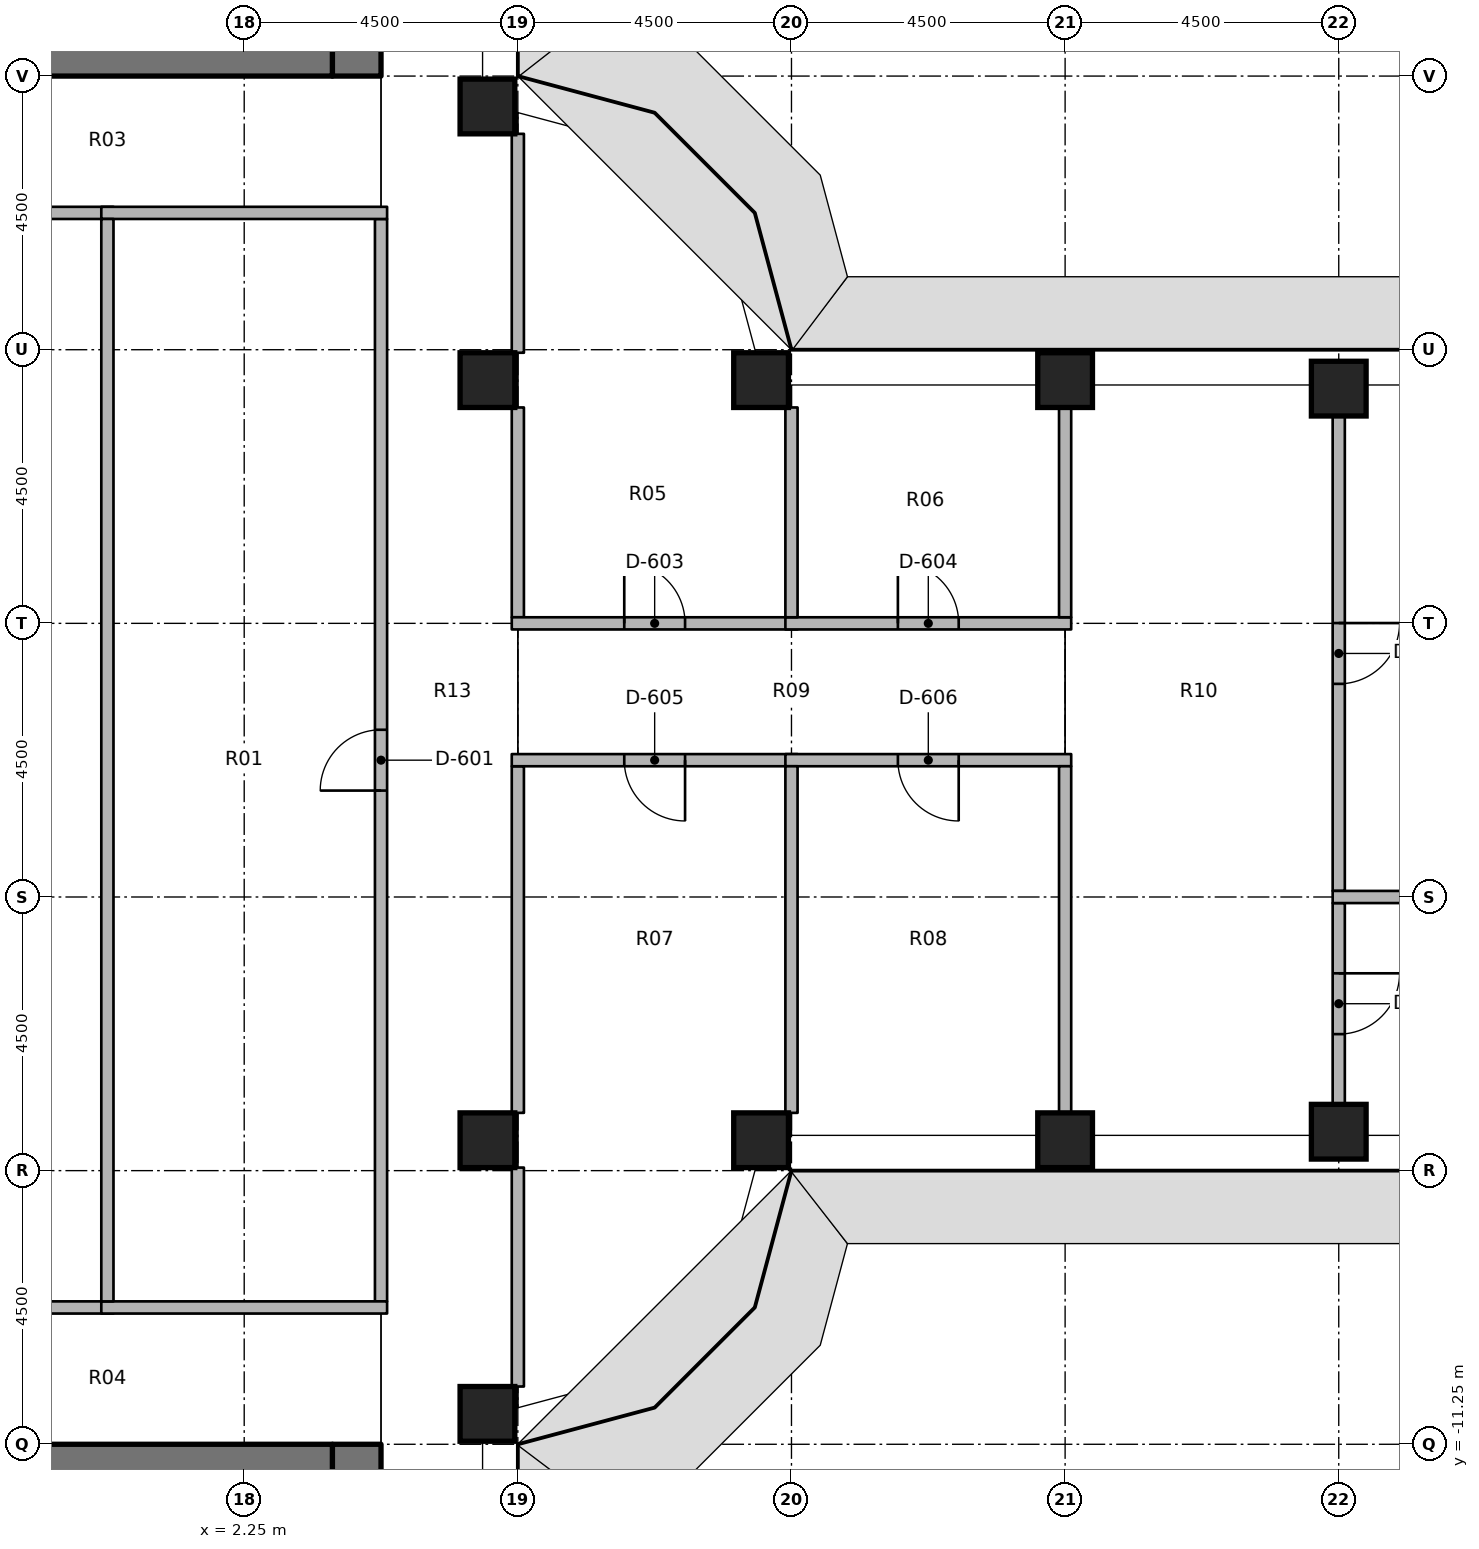
"""IFC4 building model, lengths in metres.
Left out: names, types, materials, properties, quantities, classifications, styles, units other than length and angle.
Written with IfcOpenShell. Run it as: python <this file> out.ifc"""

import sys

from ifc_helpers import new_model, si_unit, direction, frame, frame_2d, origin, origin_2d, place, context, subcontext, project, spatial, rectangle, extrude, element, fill, save


model = new_model("IFC4")
c1 = context("Model", 3, precision=1e-05, world=origin(), true_north=direction((0.0, 1.0)))
c2 = subcontext(c1, "Body", "Model", "MODEL_VIEW")
j1 = project(units=[si_unit("LENGTHUNIT", "METRE"), si_unit("PLANEANGLEUNIT", "RADIAN")], contexts=[c1])
p1 = place(None, origin())
s1 = spatial("IfcSite", under=j1, at=p1, CompositionType="ELEMENT")
p2 = place(p1, origin())
s2 = spatial("IfcBuilding", under=s1, at=p2, CompositionType="ELEMENT")
p3 = place(p2, frame((0.0, 0.0, 86.6)))
s3 = spatial("IfcBuildingStorey", under=s2, at=p3, CompositionType="ELEMENT", Elevation=86.6)
for number, where, z_axis, x_axis in (
    (1, (6.25, -10.75, 0.0), (0.0, 0.0, 1.0), (1.0, 0.0, 0.0)),
    (2, (6.25, -6.25, 0.0), (0.0, 0.0, 1.0), (1.0, 0.0, 0.0)),
    (3, (6.25, 6.25, 0.0), (0.0, 0.0, 1.0), (1.0, 0.0, 0.0)),
    (4, (6.25, 10.75, 0.0), (0.0, 0.0, 1.0), (1.0, 0.0, 0.0)),
    (5, (10.75, -6.25, 0.0), (0.0, 0.0, 1.0), (1.0, 0.0, 0.0)),
    (6, (10.75, 6.25, 0.0), (0.0, 0.0, 1.0), (1.0, 0.0, 0.0)),
    (7, (15.75, -6.25, 0.0), (0.0, 0.0, 1.0), (1.0, 0.0, 0.0)),
    (8, (15.75, 6.25, 0.0), (0.0, 0.0, 1.0), (1.0, 0.0, 0.0)),
    (9, (20.25, -6.11, 0.0), (0.0, 0.0, 1.0), (1.0, 0.0, 0.0)),
    (10, (20.25, 6.11, 0.0), (0.0, 0.0, 1.0), (1.0, 0.0, 0.0)),
):
    element("IfcColumn", number, at=place(p3, frame(where, z_axis=z_axis, x_axis=x_axis)), inside=s3, PredefinedType="COLUMN", context=c2, shape_type="SweptSolid", body=[
        extrude(rectangle(XDim=0.9, YDim=0.9, at=origin_2d()), origin(), (0.0, 0.0, 1.0), 3.65),
    ])
p4 = place(p3, frame((4.1, 11.25, 0.0), z_axis=(0.0, 0.0, 1.0), x_axis=(0.0, 1.0, 0.0)))
e11 = element("IfcWall", 11, at=p4, inside=s3, PredefinedType="SHEAR", context=c2, shape_type="SweptSolid", body=[
    extrude(rectangle(XDim=15.0, YDim=0.8, at=frame_2d((7.5, 0.0))), origin(), (0.0, 0.0, 1.0), 3.8),
])
p5 = place(p4, frame((7.15, 0.0, 0.0)))
e12 = element("IfcOpeningElement", 12, at=p5, cuts=e11, PredefinedType="OPENING", context=c2, shape_type="SweptSolid", body=[
    extrude(rectangle(XDim=1.5, YDim=2.3, at=frame_2d((0.75, 1.15))), frame((0.0, 0.41, 0.0), z_axis=(0.0, -1.0, 0.0), x_axis=(1.0, 0.0, 0.0)), (0.0, 0.0, 1.0), 0.82),
])
p6 = place(p4, frame((5.55, 0.0, 0.0)))
e13 = element("IfcOpeningElement", 13, at=p6, cuts=e11, PredefinedType="OPENING", context=c2, shape_type="SweptSolid", body=[
    extrude(rectangle(XDim=1.2, YDim=2.1, at=frame_2d((0.6, 1.05))), frame((0.0, 0.41, 0.0), z_axis=(0.0, -1.0, 0.0), x_axis=(1.0, 0.0, 0.0)), (0.0, 0.0, 1.0), 0.82),
])
p7 = place(p3, frame((-3.7, 11.65, 0.0), z_axis=(0.0, 0.0, 1.0), x_axis=(1.0, 0.0, 0.0)))
e14 = element("IfcWall", 14, at=p7, inside=s3, PredefinedType="SHEAR", context=c2, shape_type="SweptSolid", body=[
    extrude(rectangle(XDim=7.4, YDim=0.8, at=frame_2d((3.7, 0.0))), origin(), (0.0, 0.0, 1.0), 3.8),
])
p8 = place(p3, frame((4.1, -11.25, 0.0), z_axis=(0.0, 0.0, 1.0), x_axis=(0.0, -1.0, 0.0)))
e15 = element("IfcWall", 15, at=p8, inside=s3, PredefinedType="SHEAR", context=c2, shape_type="SweptSolid", body=[
    extrude(rectangle(XDim=15.0, YDim=0.8, at=frame_2d((7.5, 0.0))), origin(), (0.0, 0.0, 1.0), 3.8),
])
p9 = place(p8, frame((7.15, 0.0, 0.0)))
e16 = element("IfcOpeningElement", 16, at=p9, cuts=e15, PredefinedType="OPENING", context=c2, shape_type="SweptSolid", body=[
    extrude(rectangle(XDim=1.5, YDim=2.3, at=frame_2d((0.75, 1.15))), frame((0.0, 0.41, 0.0), z_axis=(0.0, -1.0, 0.0), x_axis=(1.0, 0.0, 0.0)), (0.0, 0.0, 1.0), 0.82),
])
p10 = place(p8, frame((13.9, 0.0, 0.0)))
e17 = element("IfcOpeningElement", 17, at=p10, cuts=e15, PredefinedType="OPENING", context=c2, shape_type="SweptSolid", body=[
    extrude(rectangle(XDim=0.9, YDim=2.1, at=frame_2d((0.45, 1.05))), frame((0.0, 0.41, 0.0), z_axis=(0.0, -1.0, 0.0), x_axis=(1.0, 0.0, 0.0)), (0.0, 0.0, 1.0), 0.82),
])
p11 = place(p8, frame((1.15, 0.0, 0.0)))
e18 = element("IfcOpeningElement", 18, at=p11, cuts=e15, PredefinedType="OPENING", context=c2, shape_type="SweptSolid", body=[
    extrude(rectangle(XDim=1.2, YDim=2.1, at=frame_2d((0.6, 1.05))), frame((0.0, 0.41, 0.0), z_axis=(0.0, -1.0, 0.0), x_axis=(1.0, 0.0, 0.0)), (0.0, 0.0, 1.0), 0.82),
])
p12 = place(p3, frame((-3.7, -11.65, 0.0), z_axis=(0.0, 0.0, 1.0), x_axis=(1.0, 0.0, 0.0)))
e19 = element("IfcWall", 19, at=p12, inside=s3, PredefinedType="SHEAR", context=c2, shape_type="SweptSolid", body=[
    extrude(rectangle(XDim=7.4, YDim=0.8, at=frame_2d((3.7, 0.0))), origin(), (0.0, 0.0, 1.0), 3.8),
])
p13 = place(p3, frame((4.5, -8.9, 0.0), z_axis=(0.0, 0.0, 1.0), x_axis=(0.0, 1.0, 0.0)))
e20 = element("IfcWall", 20, at=p13, inside=s3, PredefinedType="PARTITIONING", context=c2, shape_type="SweptSolid", body=[
    extrude(rectangle(XDim=17.8, YDim=0.2, at=frame_2d((8.9, 0.0))), origin(), (0.0, 0.0, 1.0), 2.738),
])
p14 = place(p13, frame((8.4, 0.0, 0.0)))
e21 = element("IfcOpeningElement", 21, at=p14, cuts=e20, PredefinedType="OPENING", context=c2, shape_type="SweptSolid", body=[
    extrude(rectangle(XDim=1.0, YDim=2.1, at=frame_2d((0.5, 1.05))), frame((0.0, 0.11, 0.0), z_axis=(0.0, -1.0, 0.0), x_axis=(1.0, 0.0, 0.0)), (0.0, 0.0, 1.0), 0.22),
])
p15 = place(p3, frame((6.75, 2.35, 0.0), z_axis=(0.0, 0.0, 1.0), x_axis=(0.0, 1.0, 0.0)))
e22 = element("IfcWall", 22, at=p15, inside=s3, PredefinedType="PARTITIONING", context=c2, shape_type="SweptSolid", body=[
    extrude(rectangle(XDim=3.45, YDim=0.2, at=frame_2d((1.725, 0.0))), origin(), (0.0, 0.0, 1.0), 2.738),
])
for number, where, z_axis, x_axis in (
    (23, (6.75, 6.7, 0.0), (0.0, 0.0, 1.0), (0.0, 1.0, 0.0)),
    (24, (6.75, -10.3, 0.0), (0.0, 0.0, 1.0), (0.0, 1.0, 0.0)),
):
    element("IfcWall", number, at=place(p3, frame(where, z_axis=z_axis, x_axis=x_axis)), inside=s3, PredefinedType="PARTITIONING", context=c2, shape_type="SweptSolid", body=[
        extrude(rectangle(XDim=3.6, YDim=0.2, at=frame_2d((1.8, 0.0))), origin(), (0.0, 0.0, 1.0), 2.738),
    ])
p16 = place(p3, frame((6.75, -5.8, 0.0), z_axis=(0.0, 0.0, 1.0), x_axis=(0.0, 1.0, 0.0)))
e25 = element("IfcWall", 25, at=p16, inside=s3, PredefinedType="PARTITIONING", context=c2, shape_type="SweptSolid", body=[
    extrude(rectangle(XDim=5.7, YDim=0.2, at=frame_2d((2.85, 0.0))), origin(), (0.0, 0.0, 1.0), 2.738),
])
for number, where, z_axis, x_axis in (
    (26, (-4.6, 9.0, 0.0), (0.0, 0.0, 1.0), (1.0, 0.0, 0.0)),
    (27, (-0.1, 9.0, 0.0), (0.0, 0.0, 1.0), (1.0, 0.0, 0.0)),
    (28, (-4.6, -9.0, 0.0), (0.0, 0.0, 1.0), (1.0, 0.0, 0.0)),
    (29, (-0.1, -9.0, 0.0), (0.0, 0.0, 1.0), (1.0, 0.0, 0.0)),
):
    element("IfcWall", number, at=place(p3, frame(where, z_axis=z_axis, x_axis=x_axis)), inside=s3, PredefinedType="PARTITIONING", context=c2, shape_type="SweptSolid", body=[
        extrude(rectangle(XDim=4.7, YDim=0.2, at=frame_2d((2.35, 0.0))), origin(), (0.0, 0.0, 1.0), 2.738),
    ])
p17 = place(p3, frame((0.0, -8.9, 0.0), z_axis=(0.0, 0.0, 1.0), x_axis=(0.0, 1.0, 0.0)))
e30 = element("IfcWall", 30, at=p17, inside=s3, PredefinedType="PARTITIONING", context=c2, shape_type="SweptSolid", body=[
    extrude(rectangle(XDim=17.8, YDim=0.2, at=frame_2d((8.9, 0.0))), origin(), (0.0, 0.0, 1.0), 2.738),
])
p18 = place(p3, frame((6.65, 2.25, 0.0), z_axis=(0.0, 0.0, 1.0), x_axis=(1.0, 0.0, 0.0)))
e31 = element("IfcWall", 31, at=p18, inside=s3, PredefinedType="PARTITIONING", context=c2, shape_type="SweptSolid", body=[
    extrude(rectangle(XDim=4.7, YDim=0.2, at=frame_2d((2.35, 0.0))), origin(), (0.0, 0.0, 1.0), 2.738),
])
p19 = place(p18, frame((1.85, 0.0, 0.0)))
e32 = element("IfcOpeningElement", 32, at=p19, cuts=e31, PredefinedType="OPENING", context=c2, shape_type="SweptSolid", body=[
    extrude(rectangle(XDim=1.0, YDim=2.1, at=frame_2d((0.5, 1.05))), frame((0.0, 0.11, 0.0), z_axis=(0.0, -1.0, 0.0), x_axis=(1.0, 0.0, 0.0)), (0.0, 0.0, 1.0), 0.22),
])
p20 = place(p3, frame((11.35, 0.0, 0.0), z_axis=(0.0, 0.0, 1.0), x_axis=(-1.0, 0.0, 0.0)))
e33 = element("IfcWall", 33, at=p20, inside=s3, PredefinedType="PARTITIONING", context=c2, shape_type="SweptSolid", body=[
    extrude(rectangle(XDim=4.7, YDim=0.2, at=frame_2d((2.35, 0.0))), origin(), (0.0, 0.0, 1.0), 2.738),
])
p21 = place(p20, frame((1.85, 0.0, 0.0)))
e34 = element("IfcOpeningElement", 34, at=p21, cuts=e33, PredefinedType="OPENING", context=c2, shape_type="SweptSolid", body=[
    extrude(rectangle(XDim=1.0, YDim=2.1, at=frame_2d((0.5, 1.05))), frame((0.0, 0.11, 0.0), z_axis=(0.0, -1.0, 0.0), x_axis=(1.0, 0.0, 0.0)), (0.0, 0.0, 1.0), 0.22),
])
p22 = place(p3, frame((11.15, 2.25, 0.0), z_axis=(0.0, 0.0, 1.0), x_axis=(1.0, 0.0, 0.0)))
e35 = element("IfcWall", 35, at=p22, inside=s3, PredefinedType="PARTITIONING", context=c2, shape_type="SweptSolid", body=[
    extrude(rectangle(XDim=4.7, YDim=0.2, at=frame_2d((2.35, 0.0))), origin(), (0.0, 0.0, 1.0), 2.738),
])
p23 = place(p22, frame((1.85, 0.0, 0.0)))
e36 = element("IfcOpeningElement", 36, at=p23, cuts=e35, PredefinedType="OPENING", context=c2, shape_type="SweptSolid", body=[
    extrude(rectangle(XDim=1.0, YDim=2.1, at=frame_2d((0.5, 1.05))), frame((0.0, 0.11, 0.0), z_axis=(0.0, -1.0, 0.0), x_axis=(1.0, 0.0, 0.0)), (0.0, 0.0, 1.0), 0.22),
])
p24 = place(p3, frame((15.85, 0.0, 0.0), z_axis=(0.0, 0.0, 1.0), x_axis=(-1.0, 0.0, 0.0)))
e37 = element("IfcWall", 37, at=p24, inside=s3, PredefinedType="PARTITIONING", context=c2, shape_type="SweptSolid", body=[
    extrude(rectangle(XDim=4.7, YDim=0.2, at=frame_2d((2.35, 0.0))), origin(), (0.0, 0.0, 1.0), 2.738),
])
p25 = place(p24, frame((1.85, 0.0, 0.0)))
e38 = element("IfcOpeningElement", 38, at=p25, cuts=e37, PredefinedType="OPENING", context=c2, shape_type="SweptSolid", body=[
    extrude(rectangle(XDim=1.0, YDim=2.1, at=frame_2d((0.5, 1.05))), frame((0.0, 0.11, 0.0), z_axis=(0.0, -1.0, 0.0), x_axis=(1.0, 0.0, 0.0)), (0.0, 0.0, 1.0), 0.22),
])
p26 = place(p3, frame((11.25, 2.35, 0.0), z_axis=(0.0, 0.0, 1.0), x_axis=(0.0, 1.0, 0.0)))
e39 = element("IfcWall", 39, at=p26, inside=s3, PredefinedType="PARTITIONING", context=c2, shape_type="SweptSolid", body=[
    extrude(rectangle(XDim=3.45, YDim=0.2, at=frame_2d((1.725, 0.0))), origin(), (0.0, 0.0, 1.0), 2.738),
])
p27 = place(p3, frame((11.25, -5.8, 0.0), z_axis=(0.0, 0.0, 1.0), x_axis=(0.0, 1.0, 0.0)))
e40 = element("IfcWall", 40, at=p27, inside=s3, PredefinedType="PARTITIONING", context=c2, shape_type="SweptSolid", body=[
    extrude(rectangle(XDim=5.7, YDim=0.2, at=frame_2d((2.85, 0.0))), origin(), (0.0, 0.0, 1.0), 2.738),
])
p28 = place(p3, frame((15.75, 2.35, 0.0), z_axis=(0.0, 0.0, 1.0), x_axis=(0.0, 1.0, 0.0)))
e41 = element("IfcWall", 41, at=p28, inside=s3, PredefinedType="PARTITIONING", context=c2, shape_type="SweptSolid", body=[
    extrude(rectangle(XDim=3.45, YDim=0.2, at=frame_2d((1.725, 0.0))), origin(), (0.0, 0.0, 1.0), 2.738),
])
p29 = place(p3, frame((15.75, -5.8, 0.0), z_axis=(0.0, 0.0, 1.0), x_axis=(0.0, 1.0, 0.0)))
e42 = element("IfcWall", 42, at=p29, inside=s3, PredefinedType="PARTITIONING", context=c2, shape_type="SweptSolid", body=[
    extrude(rectangle(XDim=5.7, YDim=0.2, at=frame_2d((2.85, 0.0))), origin(), (0.0, 0.0, 1.0), 2.738),
])
p30 = place(p3, frame((20.25, -2.35, 0.0), z_axis=(0.0, 0.0, 1.0), x_axis=(0.0, -1.0, 0.0)))
e43 = element("IfcWall", 43, at=p30, inside=s3, PredefinedType="PARTITIONING", context=c2, shape_type="SweptSolid", body=[
    extrude(rectangle(XDim=3.31, YDim=0.2, at=frame_2d((1.655, 0.0))), origin(), (0.0, 0.0, 1.0), 2.738),
])
p31 = place(p30, frame((1.155, 0.0, 0.0)))
e44 = element("IfcOpeningElement", 44, at=p31, cuts=e43, PredefinedType="OPENING", context=c2, shape_type="SweptSolid", body=[
    extrude(rectangle(XDim=1.0, YDim=2.1, at=frame_2d((0.5, 1.05))), frame((0.0, 0.11, 0.0), z_axis=(0.0, -1.0, 0.0), x_axis=(1.0, 0.0, 0.0)), (0.0, 0.0, 1.0), 0.22),
])
p32 = place(p3, frame((20.25, 5.66, 0.0), z_axis=(0.0, 0.0, 1.0), x_axis=(0.0, -1.0, 0.0)))
e45 = element("IfcWall", 45, at=p32, inside=s3, PredefinedType="PARTITIONING", context=c2, shape_type="SweptSolid", body=[
    extrude(rectangle(XDim=7.81, YDim=0.2, at=frame_2d((3.905, 0.0))), origin(), (0.0, 0.0, 1.0), 2.738),
])
p33 = place(p32, frame((3.405, 0.0, 0.0)))
e46 = element("IfcOpeningElement", 46, at=p33, cuts=e45, PredefinedType="OPENING", context=c2, shape_type="SweptSolid", body=[
    extrude(rectangle(XDim=1.0, YDim=2.1, at=frame_2d((0.5, 1.05))), frame((0.0, 0.11, 0.0), z_axis=(0.0, -1.0, 0.0), x_axis=(1.0, 0.0, 0.0)), (0.0, 0.0, 1.0), 0.22),
])
p34 = place(p3, frame((20.15, -2.25, 0.0), z_axis=(0.0, 0.0, 1.0), x_axis=(1.0, 0.0, 0.0)))
e47 = element("IfcWall", 47, at=p34, inside=s3, PredefinedType="PARTITIONING", context=c2, shape_type="SweptSolid", body=[
    extrude(rectangle(XDim=8.07, YDim=0.2, at=frame_2d((4.035, 0.0))), origin(), (0.0, 0.0, 1.0), 2.738),
])
p35 = place(p14, origin())
e48 = element("IfcDoor", 48, at=p35, inside=s3, OperationType="SINGLE_SWING_RIGHT", PredefinedType="DOOR", context=c2, shape_type="SweptSolid", body=[
    extrude(rectangle(XDim=1.0, YDim=2.1, at=frame_2d((0.5, 1.05))), frame((0.0, 0.025, 0.0), z_axis=(0.0, -1.0, 0.0), x_axis=(1.0, 0.0, 0.0)), (0.0, 0.0, 1.0), 0.05),
])
fill(e21, e48)
p36 = place(p19, origin())
e49 = element("IfcDoor", 49, at=p36, inside=s3, OperationType="SINGLE_SWING_RIGHT", PredefinedType="DOOR", context=c2, shape_type="SweptSolid", body=[
    extrude(rectangle(XDim=1.0, YDim=2.1, at=frame_2d((0.5, 1.05))), frame((0.0, 0.025, 0.0), z_axis=(0.0, -1.0, 0.0), x_axis=(1.0, 0.0, 0.0)), (0.0, 0.0, 1.0), 0.05),
])
fill(e32, e49)
p37 = place(p23, origin())
e50 = element("IfcDoor", 50, at=p37, inside=s3, OperationType="SINGLE_SWING_RIGHT", PredefinedType="DOOR", context=c2, shape_type="SweptSolid", body=[
    extrude(rectangle(XDim=1.0, YDim=2.1, at=frame_2d((0.5, 1.05))), frame((0.0, 0.025, 0.0), z_axis=(0.0, -1.0, 0.0), x_axis=(1.0, 0.0, 0.0)), (0.0, 0.0, 1.0), 0.05),
])
fill(e36, e50)
p38 = place(p21, origin())
e51 = element("IfcDoor", 51, at=p38, inside=s3, OperationType="SINGLE_SWING_RIGHT", PredefinedType="DOOR", context=c2, shape_type="SweptSolid", body=[
    extrude(rectangle(XDim=1.0, YDim=2.1, at=frame_2d((0.5, 1.05))), frame((0.0, 0.025, 0.0), z_axis=(0.0, -1.0, 0.0), x_axis=(1.0, 0.0, 0.0)), (0.0, 0.0, 1.0), 0.05),
])
fill(e34, e51)
p39 = place(p25, origin())
e52 = element("IfcDoor", 52, at=p39, inside=s3, OperationType="SINGLE_SWING_RIGHT", PredefinedType="DOOR", context=c2, shape_type="SweptSolid", body=[
    extrude(rectangle(XDim=1.0, YDim=2.1, at=frame_2d((0.5, 1.05))), frame((0.0, 0.025, 0.0), z_axis=(0.0, -1.0, 0.0), x_axis=(1.0, 0.0, 0.0)), (0.0, 0.0, 1.0), 0.05),
])
fill(e38, e52)
p40 = place(p31, origin())
e53 = element("IfcDoor", 53, at=p40, inside=s3, OperationType="SINGLE_SWING_LEFT", PredefinedType="DOOR", context=c2, shape_type="SweptSolid", body=[
    extrude(rectangle(XDim=1.0, YDim=2.1, at=frame_2d((0.5, 1.05))), frame((0.0, 0.025, 0.0), z_axis=(0.0, -1.0, 0.0), x_axis=(1.0, 0.0, 0.0)), (0.0, 0.0, 1.0), 0.05),
])
fill(e44, e53)
p41 = place(p33, origin())
e54 = element("IfcDoor", 54, at=p41, inside=s3, OperationType="SINGLE_SWING_RIGHT", PredefinedType="DOOR", context=c2, shape_type="SweptSolid", body=[
    extrude(rectangle(XDim=1.0, YDim=2.1, at=frame_2d((0.5, 1.05))), frame((0.0, 0.025, 0.0), z_axis=(0.0, -1.0, 0.0), x_axis=(1.0, 0.0, 0.0)), (0.0, 0.0, 1.0), 0.05),
])
fill(e46, e54)
save(model, sys.argv[1])
